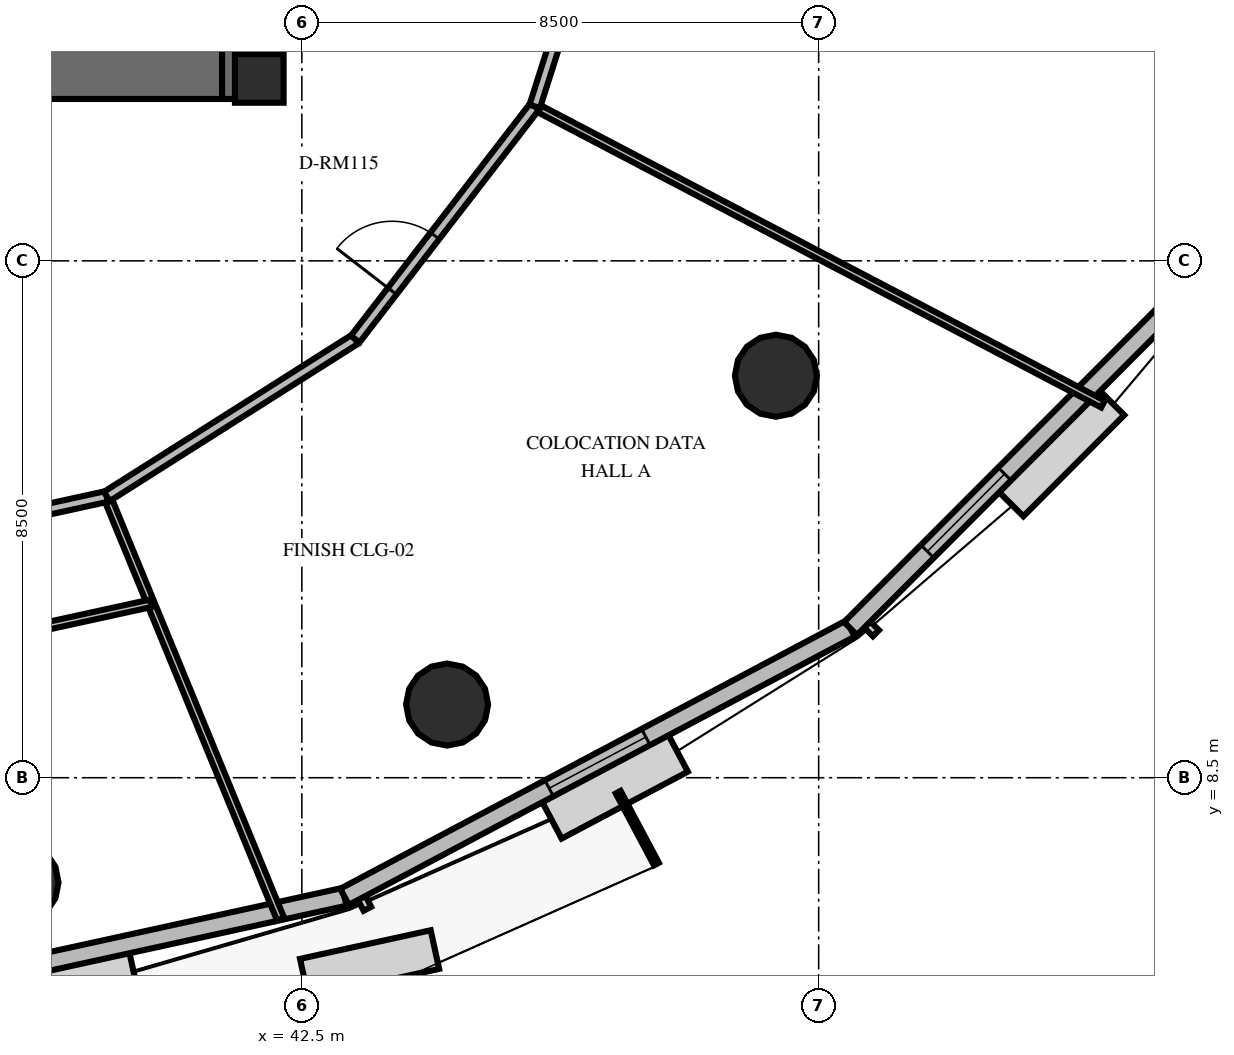
"""IFC4 building model, lengths in metres.
Left out: names, types, materials, properties, quantities, classifications, styles, units other than length and angle.
Written with IfcOpenShell. Run it as: python <this file> out.ifc"""

import sys

from ifc_helpers import new_model, si_unit, direction, frame, frame_2d, origin, origin_2d, place, context, subcontext, project, spatial, rectangle, circle, extrude, element, fill, save


model = new_model("IFC4")
c1 = context("Model", 3, precision=1e-05, world=origin(), true_north=direction((0.0, 1.0)))
c2 = subcontext(c1, "Body", "Model", "MODEL_VIEW")
j1 = project(units=[si_unit("LENGTHUNIT", "METRE"), si_unit("PLANEANGLEUNIT", "RADIAN")], contexts=[c1])
p1 = place(None, origin())
s1 = spatial("IfcSite", under=j1, at=p1, CompositionType="ELEMENT")
p2 = place(p1, origin())
s2 = spatial("IfcBuilding", under=s1, at=p2, CompositionType="ELEMENT")
p3 = place(p2, frame((0.0, 0.0, 84.6)))
s3 = spatial("IfcBuildingStorey", under=s2, at=p3, CompositionType="ELEMENT", Elevation=84.6)
p4 = place(p3, frame((25.922, 20.112, 0.0), z_axis=(0.0, 0.0, 1.0), x_axis=(1.0, 0.0, 0.0)))
e1 = element("IfcWall", 1, at=p4, inside=s3, PredefinedType="SHEAR", context=c2, shape_type="SweptSolid", body=[
    extrude(rectangle(XDim=16.166, YDim=0.9, at=frame_2d((8.083, 0.0))), origin(), (0.0, 0.0, 1.0), 4.2),
])
p5 = place(p3, frame((41.638, 19.662, 0.0), z_axis=(0.0, 0.0, 1.0), x_axis=(0.0, 1.0, 0.0)))
e2 = element("IfcWall", 2, at=p5, inside=s3, PredefinedType="SHEAR", context=c2, shape_type="SweptSolid", body=[
    extrude(rectangle(XDim=10.876, YDim=0.9, at=frame_2d((5.438, 0.0))), origin(), (0.0, 0.0, 1.0), 4.2),
])
p6 = place(p3, frame((41.8, 20.0, 0.0), z_axis=(0.0, 0.0, 1.0), x_axis=(1.0, 0.0, 0.0)))
e3 = element("IfcColumn", 3, at=p6, inside=s3, PredefinedType="PILASTER", context=c2, shape_type="SweptSolid", body=[
    extrude(rectangle(XDim=0.8, YDim=0.8, at=origin_2d()), origin(), (0.0, 0.0, 1.0), 4.2),
])
for number, where, z_axis, x_axis in (
    (4, (37.824, 6.777, 0.0), (0.0, 0.0, 1.0), (1.0, 0.0, 0.0)),
    (5, (44.889, 9.703, 0.0), (0.0, 0.0, 1.0), (1.0, 0.0, 0.0)),
    (6, (50.297, 15.111, 0.0), (0.0, 0.0, 1.0), (1.0, 0.0, 0.0)),
):
    element("IfcColumn", number, at=place(p3, frame(where, z_axis=z_axis, x_axis=x_axis)), inside=s3, PredefinedType="COLUMN", context=c2, shape_type="SweptSolid", body=[
        extrude(circle(Radius=0.675, at=origin_2d()), origin(), (0.0, 0.0, 1.0), 4.2),
    ])
p7 = place(p3, frame((33.771, 4.477, 0.0), z_axis=(0.0, 0.0, 1.0), x_axis=(0.97686057385, 0.213877112516, 0.0)))
e7 = element("IfcWall", 7, at=p7, inside=s3, PredefinedType="SOLIDWALL", context=c2, shape_type="SweptSolid", body=[
    extrude(rectangle(XDim=9.655, YDim=0.3, at=frame_2d((4.827, 0.0))), origin(), (0.0, 0.0, 1.0), 2.96),
])
p8 = place(p7, frame((0.35, 0.0, 0.0)))
e8 = element("IfcOpeningElement", 8, at=p8, cuts=e7, PredefinedType="OPENING", context=c2, shape_type="SweptSolid", body=[
    extrude(rectangle(XDim=1.05, YDim=2.15, at=frame_2d((0.525, 1.075))), frame((0.0, 0.16, 0.0), z_axis=(0.0, -1.0, 0.0), x_axis=(1.0, 0.0, 0.0)), (0.0, 0.0, 1.0), 0.32),
])
p9 = place(p3, frame((43.202, 6.542, 0.0), z_axis=(0.0, 0.0, 1.0), x_axis=(0.883498349033, 0.468434272076, 0.0)))
e9 = element("IfcWall", 9, at=p9, inside=s3, PredefinedType="SOLIDWALL", context=c2, shape_type="SweptSolid", body=[
    extrude(rectangle(XDim=9.419, YDim=0.3, at=frame_2d((4.709, 0.0))), origin(), (0.0, 0.0, 1.0), 2.96),
])
p10 = place(p9, frame((3.809, 0.0, 0.8)))
e10 = element("IfcOpeningElement", 10, at=p10, cuts=e9, PredefinedType="OPENING", context=c2, shape_type="SweptSolid", body=[
    extrude(rectangle(XDim=1.8, YDim=1.95, at=frame_2d((0.9, 0.975))), frame((0.0, 0.16, 0.0), z_axis=(0.0, -1.0, 0.0), x_axis=(1.0, 0.0, 0.0)), (0.0, 0.0, 1.0), 0.32),
])
p11 = place(p3, frame((51.524, 10.954, 0.0), z_axis=(0.0, 0.0, 1.0), x_axis=(0.7060369774, 0.708174968877, 0.0)))
e11 = element("IfcWall", 11, at=p11, inside=s3, PredefinedType="SOLIDWALL", context=c2, shape_type="SweptSolid", body=[
    extrude(rectangle(XDim=8.793, YDim=0.3, at=frame_2d((4.396, 0.0))), origin(), (0.0, 0.0, 1.0), 2.96),
])
p12 = place(p11, frame((1.79, 0.0, 0.8)))
e12 = element("IfcOpeningElement", 12, at=p12, cuts=e11, PredefinedType="OPENING", context=c2, shape_type="SweptSolid", body=[
    extrude(rectangle(XDim=1.8, YDim=1.95, at=frame_2d((0.9, 0.975))), frame((0.0, 0.16, 0.0), z_axis=(0.0, -1.0, 0.0), x_axis=(1.0, 0.0, 0.0)), (0.0, 0.0, 1.0), 0.32),
])
p13 = place(p3, frame((39.293, 13.126, 0.0), z_axis=(0.0, 0.0, 1.0), x_axis=(0.380252950753, -0.924882529538, 0.0)))
e13 = element("IfcWall", 13, at=p13, inside=s3, PredefinedType="PARTITIONING", context=c2, shape_type="SweptSolid", body=[
    extrude(rectangle(XDim=7.514, YDim=0.125, at=frame_2d((3.757, 0.0))), origin(), (0.0, 0.0, 1.0), 2.96),
])
p14 = place(p3, frame((34.571, 12.092, 0.0), z_axis=(0.0, 0.0, 1.0), x_axis=(0.976860794811, 0.213876103295, 0.0)))
e14 = element("IfcWall", 14, at=p14, inside=s3, PredefinedType="PARTITIONING", context=c2, shape_type="SweptSolid", body=[
    extrude(rectangle(XDim=4.834, YDim=0.18, at=frame_2d((2.417, 0.0))), origin(), (0.0, 0.0, 1.0), 2.96),
])
p15 = place(p3, frame((34.649, 10.193, 0.0), z_axis=(0.0, 0.0, 1.0), x_axis=(0.976862897435, 0.213866499516, 0.0)))
e15 = element("IfcWall", 15, at=p15, inside=s3, PredefinedType="PARTITIONING", context=c2, shape_type="SweptSolid", body=[
    extrude(rectangle(XDim=5.494, YDim=0.125, at=frame_2d((2.747, 0.0))), origin(), (0.0, 0.0, 1.0), 2.96),
])
p16 = place(p3, frame((46.33, 19.54, 0.0), z_axis=(0.0, 0.0, 1.0), x_axis=(0.885792580472, -0.464081355348, 0.0)))
e16 = element("IfcWall", 16, at=p16, inside=s3, PredefinedType="PARTITIONING", context=c2, shape_type="SweptSolid", body=[
    extrude(rectangle(XDim=10.55, YDim=0.125, at=frame_2d((5.275, 0.0))), origin(), (0.0, 0.0, 1.0), 2.96),
])
p17 = place(p3, frame((39.293, 13.126, 0.0), z_axis=(0.0, 0.0, 1.0), x_axis=(0.844805378334, 0.535073707762, 0.0)))
e17 = element("IfcWall", 17, at=p17, inside=s3, PredefinedType="PARTITIONING", context=c2, shape_type="SweptSolid", body=[
    extrude(rectangle(XDim=4.834, YDim=0.18, at=frame_2d((2.417, 0.0))), origin(), (0.0, 0.0, 1.0), 2.96),
])
p18 = place(p3, frame((43.377, 15.712, 0.0), z_axis=(0.0, 0.0, 1.0), x_axis=(0.610827876175, 0.791763415224, 0.0)))
e18 = element("IfcWall", 18, at=p18, inside=s3, PredefinedType="PARTITIONING", context=c2, shape_type="SweptSolid", body=[
    extrude(rectangle(XDim=4.835, YDim=0.18, at=frame_2d((2.417, 0.0))), origin(), (0.0, 0.0, 1.0), 2.96),
])
p19 = place(p18, frame((0.996, 0.0, 0.0)))
e19 = element("IfcOpeningElement", 19, at=p19, cuts=e18, PredefinedType="OPENING", context=c2, shape_type="SweptSolid", body=[
    extrude(rectangle(XDim=1.15, YDim=2.15, at=frame_2d((0.575, 1.075))), frame((0.0, 0.1, 0.0), z_axis=(0.0, -1.0, 0.0), x_axis=(1.0, 0.0, 0.0)), (0.0, 0.0, 1.0), 0.2),
])
p20 = place(p3, frame((46.33, 19.54, 0.0), z_axis=(0.0, 0.0, 1.0), x_axis=(0.303214079813, 0.952922463689, 0.0)))
e20 = element("IfcWall", 20, at=p20, inside=s3, PredefinedType="PARTITIONING", context=c2, shape_type="SweptSolid", body=[
    extrude(rectangle(XDim=4.834, YDim=0.18, at=frame_2d((2.417, 0.0))), origin(), (0.0, 0.0, 1.0), 2.96),
])
p21 = place(p10, origin())
e21 = element("IfcWindow", 21, at=p21, inside=s3, PartitioningType="SINGLE_PANEL", PredefinedType="WINDOW", context=c2, shape_type="SweptSolid", body=[
    extrude(rectangle(XDim=1.8, YDim=1.95, at=frame_2d((0.9, 0.975))), frame((0.0, 0.03, 0.0), z_axis=(0.0, -1.0, 0.0), x_axis=(1.0, 0.0, 0.0)), (0.0, 0.0, 1.0), 0.06),
])
fill(e10, e21)
p22 = place(p12, origin())
e22 = element("IfcWindow", 22, at=p22, inside=s3, PartitioningType="SINGLE_PANEL", PredefinedType="WINDOW", context=c2, shape_type="SweptSolid", body=[
    extrude(rectangle(XDim=1.8, YDim=1.95, at=frame_2d((0.9, 0.975))), frame((0.0, 0.03, 0.0), z_axis=(0.0, -1.0, 0.0), x_axis=(1.0, 0.0, 0.0)), (0.0, 0.0, 1.0), 0.06),
])
fill(e12, e22)
p23 = place(p19, origin())
e23 = element("IfcDoor", 23, at=p23, inside=s3, OperationType="SINGLE_SWING_LEFT", PredefinedType="DOOR", context=c2, shape_type="SweptSolid", body=[
    extrude(rectangle(XDim=1.15, YDim=2.15, at=frame_2d((0.575, 1.075))), frame((0.0, 0.025, 0.0), z_axis=(0.0, -1.0, 0.0), x_axis=(1.0, 0.0, 0.0)), (0.0, 0.0, 1.0), 0.05),
])
fill(e19, e23)
save(model, sys.argv[1])
